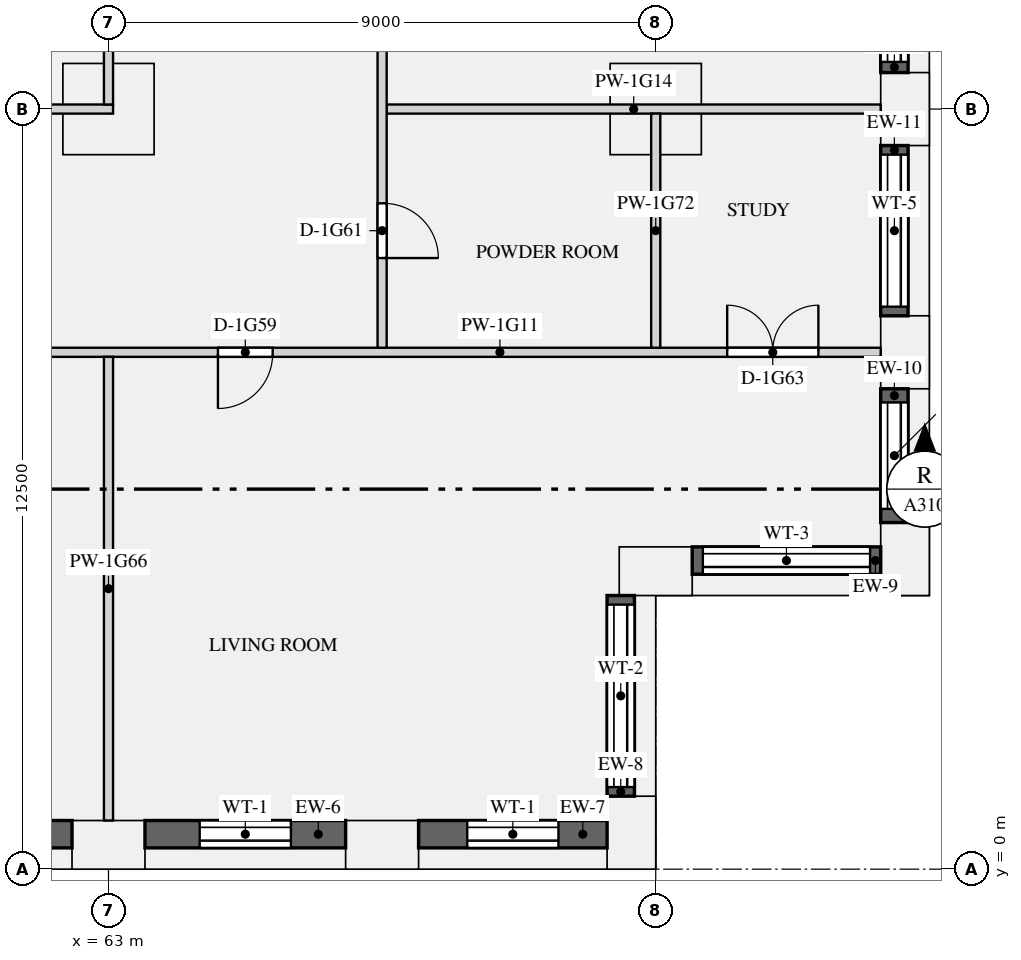
"""IFC4 building model, lengths in metres.
Left out: names, types, materials, properties, quantities, classifications, styles, units other than length and angle.
Written with IfcOpenShell. Run it as: python <this file> out.ifc"""

import sys

from ifc_helpers import new_model, si_unit, direction, frame, frame_2d, origin, origin_2d, place, context, subcontext, project, spatial, rectangle, extrude, element, fill, save


model = new_model("IFC4")
c1 = context("Model", 3, precision=1e-05, world=origin(), true_north=direction((0.0, 1.0)))
c2 = subcontext(c1, "Body", "Model", "MODEL_VIEW")
j1 = project(units=[si_unit("LENGTHUNIT", "METRE"), si_unit("PLANEANGLEUNIT", "RADIAN")], contexts=[c1])
p1 = place(None, origin())
s1 = spatial("IfcSite", under=j1, at=p1, CompositionType="ELEMENT")
p2 = place(p1, origin())
s2 = spatial("IfcBuilding", under=s1, at=p2, CompositionType="ELEMENT")
p3 = place(p2, frame((0.0, 0.0, 66.75)))
s3 = spatial("IfcBuildingStorey", under=s2, at=p3, CompositionType="ELEMENT", Elevation=66.75)
for number, where, z_axis, x_axis in (
    (1, (63.0, 0.4, 0.0), (0.0, 0.0, 1.0), (1.0, 0.0, 0.0)),
    (2, (67.5, 0.4, 0.0), (0.0, 0.0, 1.0), (1.0, 0.0, 0.0)),
    (3, (71.6, 0.6, 0.0), (0.0, 0.0, 1.0), (0.0, 1.0, 0.0)),
    (4, (72.0, 4.9, 0.0), (0.0, 0.0, 1.0), (1.0, 0.0, 0.0)),
    (5, (76.1, 5.1, 0.0), (0.0, 0.0, 1.0), (0.0, 1.0, 0.0)),
    (6, (76.1, 8.5, 0.0), (0.0, 0.0, 1.0), (0.0, 1.0, 0.0)),
    (7, (76.1, 12.5, 0.0), (0.0, 0.0, 1.0), (0.0, 1.0, 0.0)),
):
    element("IfcColumn", number, at=place(p3, frame(where, z_axis=z_axis, x_axis=x_axis)), inside=s3, PredefinedType="USERDEFINED", context=c2, shape_type="SweptSolid", body=[
        extrude(rectangle(XDim=1.2, YDim=0.8, at=origin_2d()), origin(), (0.0, 0.0, 1.0), 3.15),
    ])
for number, where, z_axis, x_axis in (
    (8, (63.0, 12.5, 0.0), (0.0, 0.0, 1.0), (1.0, 0.0, 0.0)),
    (9, (72.0, 12.5, 0.0), (0.0, 0.0, 1.0), (1.0, 0.0, 0.0)),
):
    element("IfcColumn", number, at=place(p3, frame(where, z_axis=z_axis, x_axis=x_axis)), inside=s3, PredefinedType="COLUMN", context=c2, shape_type="SweptSolid", body=[
        extrude(rectangle(XDim=1.5, YDim=1.5, at=origin_2d()), origin(), (0.0, 0.0, 1.0), 3.15),
    ])
p4 = place(p3, frame((59.1, 0.575, 0.9), z_axis=(0.0, 0.0, 1.0), x_axis=(1.0, 0.0, 0.0)))
e10 = element("IfcWall", 10, at=p4, inside=s3, PredefinedType="SOLIDWALL", context=c2, shape_type="SweptSolid", body=[
    extrude(rectangle(XDim=3.3, YDim=0.45, at=frame_2d((1.65, 0.0))), origin(), (0.0, 0.0, 1.0), 1.93),
])
p5 = place(p4, frame((0.9, 0.0, 0.15)))
e11 = element("IfcOpeningElement", 11, at=p5, cuts=e10, PredefinedType="OPENING", context=c2, shape_type="SweptSolid", body=[
    extrude(rectangle(XDim=1.5, YDim=1.5, at=frame_2d((0.75, 0.75))), frame((0.0, 0.235, 0.0), z_axis=(0.0, -1.0, 0.0), x_axis=(1.0, 0.0, 0.0)), (0.0, 0.0, 1.0), 0.47),
])
p6 = place(p3, frame((63.6, 0.575, 0.9), z_axis=(0.0, 0.0, 1.0), x_axis=(1.0, 0.0, 0.0)))
e12 = element("IfcWall", 12, at=p6, inside=s3, PredefinedType="SOLIDWALL", context=c2, shape_type="SweptSolid", body=[
    extrude(rectangle(XDim=3.3, YDim=0.45, at=frame_2d((1.65, 0.0))), origin(), (0.0, 0.0, 1.0), 1.93),
])
p7 = place(p6, frame((0.9, 0.0, 0.15)))
e13 = element("IfcOpeningElement", 13, at=p7, cuts=e12, PredefinedType="OPENING", context=c2, shape_type="SweptSolid", body=[
    extrude(rectangle(XDim=1.5, YDim=1.5, at=frame_2d((0.75, 0.75))), frame((0.0, 0.235, 0.0), z_axis=(0.0, -1.0, 0.0), x_axis=(1.0, 0.0, 0.0)), (0.0, 0.0, 1.0), 0.47),
])
p8 = place(p3, frame((68.1, 0.575, 0.9), z_axis=(0.0, 0.0, 1.0), x_axis=(1.0, 0.0, 0.0)))
e14 = element("IfcWall", 14, at=p8, inside=s3, PredefinedType="SOLIDWALL", context=c2, shape_type="SweptSolid", body=[
    extrude(rectangle(XDim=3.1, YDim=0.45, at=frame_2d((1.55, 0.0))), origin(), (0.0, 0.0, 1.0), 1.93),
])
p9 = place(p8, frame((0.8, 0.0, 0.15)))
e15 = element("IfcOpeningElement", 15, at=p9, cuts=e14, PredefinedType="OPENING", context=c2, shape_type="SweptSolid", body=[
    extrude(rectangle(XDim=1.5, YDim=1.5, at=frame_2d((0.75, 0.75))), frame((0.0, 0.235, 0.0), z_axis=(0.0, -1.0, 0.0), x_axis=(1.0, 0.0, 0.0)), (0.0, 0.0, 1.0), 0.47),
])
p10 = place(p3, frame((71.425, 1.2, 0.9), z_axis=(0.0, 0.0, 1.0), x_axis=(0.0, 1.0, 0.0)))
e16 = element("IfcWall", 16, at=p10, inside=s3, PredefinedType="SOLIDWALL", context=c2, shape_type="SweptSolid", body=[
    extrude(rectangle(XDim=3.3, YDim=0.45, at=frame_2d((1.65, 0.0))), origin(), (0.0, 0.0, 1.0), 1.93),
])
p11 = place(p10, frame((0.15, 0.0, 0.15)))
e17 = element("IfcOpeningElement", 17, at=p11, cuts=e16, PredefinedType="OPENING", context=c2, shape_type="SweptSolid", body=[
    extrude(rectangle(XDim=3.0, YDim=1.5, at=frame_2d((1.5, 0.75))), frame((0.0, 0.235, 0.0), z_axis=(0.0, -1.0, 0.0), x_axis=(1.0, 0.0, 0.0)), (0.0, 0.0, 1.0), 0.47),
])
p12 = place(p3, frame((72.6, 5.075, 0.9), z_axis=(0.0, 0.0, 1.0), x_axis=(1.0, 0.0, 0.0)))
e18 = element("IfcWall", 18, at=p12, inside=s3, PredefinedType="SOLIDWALL", context=c2, shape_type="SweptSolid", body=[
    extrude(rectangle(XDim=3.1, YDim=0.45, at=frame_2d((1.55, 0.0))), origin(), (0.0, 0.0, 1.0), 1.93),
])
p13 = place(p12, frame((0.175, 0.0, 0.15)))
e19 = element("IfcOpeningElement", 19, at=p13, cuts=e18, PredefinedType="OPENING", context=c2, shape_type="SweptSolid", body=[
    extrude(rectangle(XDim=2.75, YDim=1.5, at=frame_2d((1.375, 0.75))), frame((0.0, 0.235, 0.0), z_axis=(0.0, -1.0, 0.0), x_axis=(1.0, 0.0, 0.0)), (0.0, 0.0, 1.0), 0.47),
])
p14 = place(p3, frame((75.925, 5.7, 0.9), z_axis=(0.0, 0.0, 1.0), x_axis=(0.0, 1.0, 0.0)))
e20 = element("IfcWall", 20, at=p14, inside=s3, PredefinedType="SOLIDWALL", context=c2, shape_type="SweptSolid", body=[
    extrude(rectangle(XDim=2.2, YDim=0.45, at=frame_2d((1.1, 0.0))), origin(), (0.0, 0.0, 1.0), 1.93),
])
p15 = place(p14, frame((0.225, 0.0, 0.15)))
e21 = element("IfcOpeningElement", 21, at=p15, cuts=e20, PredefinedType="OPENING", context=c2, shape_type="SweptSolid", body=[
    extrude(rectangle(XDim=1.75, YDim=1.5, at=frame_2d((0.875, 0.75))), frame((0.0, 0.235, 0.0), z_axis=(0.0, -1.0, 0.0), x_axis=(1.0, 0.0, 0.0)), (0.0, 0.0, 1.0), 0.47),
])
p16 = place(p3, frame((75.925, 9.1, 0.9), z_axis=(0.0, 0.0, 1.0), x_axis=(0.0, 1.0, 0.0)))
e22 = element("IfcWall", 22, at=p16, inside=s3, PredefinedType="SOLIDWALL", context=c2, shape_type="SweptSolid", body=[
    extrude(rectangle(XDim=2.8, YDim=0.45, at=frame_2d((1.4, 0.0))), origin(), (0.0, 0.0, 1.0), 1.93),
])
p17 = place(p16, frame((0.15, 0.0, 0.15)))
e23 = element("IfcOpeningElement", 23, at=p17, cuts=e22, PredefinedType="OPENING", context=c2, shape_type="SweptSolid", body=[
    extrude(rectangle(XDim=2.5, YDim=1.5, at=frame_2d((1.25, 0.75))), frame((0.0, 0.235, 0.0), z_axis=(0.0, -1.0, 0.0), x_axis=(1.0, 0.0, 0.0)), (0.0, 0.0, 1.0), 0.47),
])
p18 = place(p3, frame((75.925, 13.1, 0.9), z_axis=(0.0, 0.0, 1.0), x_axis=(0.0, 1.0, 0.0)))
e24 = element("IfcWall", 24, at=p18, inside=s3, PredefinedType="SOLIDWALL", context=c2, shape_type="SweptSolid", body=[
    extrude(rectangle(XDim=2.6, YDim=0.45, at=frame_2d((1.3, 0.0))), origin(), (0.0, 0.0, 1.0), 1.93),
])
p19 = place(p18, frame((0.175, 0.0, 0.15)))
e25 = element("IfcOpeningElement", 25, at=p19, cuts=e24, PredefinedType="OPENING", context=c2, shape_type="SweptSolid", body=[
    extrude(rectangle(XDim=2.25, YDim=1.5, at=frame_2d((1.125, 0.75))), frame((0.0, 0.235, 0.0), z_axis=(0.0, -1.0, 0.0), x_axis=(1.0, 0.0, 0.0)), (0.0, 0.0, 1.0), 0.47),
])
p20 = place(p3, frame((54.0, 8.5, 0.0), z_axis=(0.0, 0.0, 1.0), x_axis=(1.0, 0.0, 0.0)))
e26 = element("IfcWall", 26, at=p20, inside=s3, PredefinedType="PARTITIONING", context=c2, shape_type="SweptSolid", body=[
    extrude(rectangle(XDim=21.7, YDim=0.15, at=frame_2d((10.85, 0.0))), origin(), (0.0, 0.0, 1.0), 2.83),
])
p21 = place(p20, frame((6.3, 0.0, 0.0)))
e27 = element("IfcOpeningElement", 27, at=p21, cuts=e26, PredefinedType="OPENING", context=c2, shape_type="SweptSolid", body=[
    extrude(rectangle(XDim=0.9, YDim=2.1, at=frame_2d((0.45, 1.05))), frame((0.0, 0.085, 0.0), z_axis=(0.0, -1.0, 0.0), x_axis=(1.0, 0.0, 0.0)), (0.0, 0.0, 1.0), 0.17),
])
p22 = place(p20, frame((1.8, 0.0, 0.0)))
e28 = element("IfcOpeningElement", 28, at=p22, cuts=e26, PredefinedType="OPENING", context=c2, shape_type="SweptSolid", body=[
    extrude(rectangle(XDim=0.9, YDim=2.1, at=frame_2d((0.45, 1.05))), frame((0.0, 0.085, 0.0), z_axis=(0.0, -1.0, 0.0), x_axis=(1.0, 0.0, 0.0)), (0.0, 0.0, 1.0), 0.17),
])
p23 = place(p20, frame((10.8, 0.0, 0.0)))
e29 = element("IfcOpeningElement", 29, at=p23, cuts=e26, PredefinedType="OPENING", context=c2, shape_type="SweptSolid", body=[
    extrude(rectangle(XDim=0.9, YDim=2.1, at=frame_2d((0.45, 1.05))), frame((0.0, 0.085, 0.0), z_axis=(0.0, -1.0, 0.0), x_axis=(1.0, 0.0, 0.0)), (0.0, 0.0, 1.0), 0.17),
])
p24 = place(p20, frame((19.175, 0.0, 0.0)))
e30 = element("IfcOpeningElement", 30, at=p24, cuts=e26, PredefinedType="OPENING", context=c2, shape_type="SweptSolid", body=[
    extrude(rectangle(XDim=1.5, YDim=2.1, at=frame_2d((0.75, 1.05))), frame((0.0, 0.085, 0.0), z_axis=(0.0, -1.0, 0.0), x_axis=(1.0, 0.0, 0.0)), (0.0, 0.0, 1.0), 0.17),
])
p25 = place(p3, frame((58.425, 12.5, 0.0), z_axis=(0.0, 0.0, 1.0), x_axis=(1.0, 0.0, 0.0)))
e31 = element("IfcWall", 31, at=p25, inside=s3, PredefinedType="PARTITIONING", context=c2, shape_type="SweptSolid", body=[
    extrude(rectangle(XDim=4.65, YDim=0.15, at=frame_2d((2.325, 0.0))), origin(), (0.0, 0.0, 1.0), 2.83),
])
p26 = place(p3, frame((67.575, 12.5, 0.0), z_axis=(0.0, 0.0, 1.0), x_axis=(1.0, 0.0, 0.0)))
e32 = element("IfcWall", 32, at=p26, inside=s3, PredefinedType="PARTITIONING", context=c2, shape_type="SweptSolid", body=[
    extrude(rectangle(XDim=8.125, YDim=0.15, at=frame_2d((4.062, 0.0))), origin(), (0.0, 0.0, 1.0), 2.83),
])
p27 = place(p3, frame((63.0, 0.8, 0.0), z_axis=(0.0, 0.0, 1.0), x_axis=(0.0, 1.0, 0.0)))
e33 = element("IfcWall", 33, at=p27, inside=s3, PredefinedType="PARTITIONING", context=c2, shape_type="SweptSolid", body=[
    extrude(rectangle(XDim=7.625, YDim=0.15, at=frame_2d((3.812, 0.0))), origin(), (0.0, 0.0, 1.0), 2.83),
])
p28 = place(p3, frame((63.0, 12.575, 0.0), z_axis=(0.0, 0.0, 1.0), x_axis=(0.0, 1.0, 0.0)))
e34 = element("IfcWall", 34, at=p28, inside=s3, PredefinedType="PARTITIONING", context=c2, shape_type="SweptSolid", body=[
    extrude(rectangle(XDim=15.85, YDim=0.15, at=frame_2d((7.925, 0.0))), origin(), (0.0, 0.0, 1.0), 2.83),
])
p29 = place(p28, frame((6.85, 0.0, 0.0)))
e35 = element("IfcOpeningElement", 35, at=p29, cuts=e34, PredefinedType="OPENING", context=c2, shape_type="SweptSolid", body=[
    extrude(rectangle(XDim=0.9, YDim=2.1, at=frame_2d((0.45, 1.05))), frame((0.0, 0.085, 0.0), z_axis=(0.0, -1.0, 0.0), x_axis=(1.0, 0.0, 0.0)), (0.0, 0.0, 1.0), 0.17),
])
p30 = place(p3, frame((72.0, 8.575, 0.0), z_axis=(0.0, 0.0, 1.0), x_axis=(0.0, 1.0, 0.0)))
e36 = element("IfcWall", 36, at=p30, inside=s3, PredefinedType="PARTITIONING", context=c2, shape_type="SweptSolid", body=[
    extrude(rectangle(XDim=3.85, YDim=0.15, at=frame_2d((1.925, 0.0))), origin(), (0.0, 0.0, 1.0), 2.83),
])
p31 = place(p3, frame((67.5, 8.575, 0.0), z_axis=(0.0, 0.0, 1.0), x_axis=(0.0, 1.0, 0.0)))
e37 = element("IfcWall", 37, at=p31, inside=s3, PredefinedType="PARTITIONING", context=c2, shape_type="SweptSolid", body=[
    extrude(rectangle(XDim=15.35, YDim=0.15, at=frame_2d((7.675, 0.0))), origin(), (0.0, 0.0, 1.0), 2.83),
])
p32 = place(p31, frame((7.475, 0.0, 0.0)))
e38 = element("IfcOpeningElement", 38, at=p32, cuts=e37, PredefinedType="OPENING", context=c2, shape_type="SweptSolid", body=[
    extrude(rectangle(XDim=0.9, YDim=2.1, at=frame_2d((0.45, 1.05))), frame((0.0, 0.085, 0.0), z_axis=(0.0, -1.0, 0.0), x_axis=(1.0, 0.0, 0.0)), (0.0, 0.0, 1.0), 0.17),
])
p33 = place(p31, frame((1.475, 0.0, 0.0)))
e39 = element("IfcOpeningElement", 39, at=p33, cuts=e37, PredefinedType="OPENING", context=c2, shape_type="SweptSolid", body=[
    extrude(rectangle(XDim=0.9, YDim=2.1, at=frame_2d((0.45, 1.05))), frame((0.0, 0.085, 0.0), z_axis=(0.0, -1.0, 0.0), x_axis=(1.0, 0.0, 0.0)), (0.0, 0.0, 1.0), 0.17),
])
p34 = place(p7, origin())
e40 = element("IfcWindow", 40, at=p34, inside=s3, PartitioningType="SINGLE_PANEL", PredefinedType="WINDOW", context=c2, shape_type="SweptSolid", body=[
    extrude(rectangle(XDim=1.5, YDim=1.5, at=frame_2d((0.75, 0.75))), frame((0.0, -0.065, 0.0), z_axis=(0.0, -1.0, 0.0), x_axis=(1.0, 0.0, 0.0)), (0.0, 0.0, 1.0), 0.06),
])
fill(e13, e40)
p35 = place(p9, origin())
e41 = element("IfcWindow", 41, at=p35, inside=s3, PartitioningType="SINGLE_PANEL", PredefinedType="WINDOW", context=c2, shape_type="SweptSolid", body=[
    extrude(rectangle(XDim=1.5, YDim=1.5, at=frame_2d((0.75, 0.75))), frame((0.0, -0.065, 0.0), z_axis=(0.0, -1.0, 0.0), x_axis=(1.0, 0.0, 0.0)), (0.0, 0.0, 1.0), 0.06),
])
fill(e15, e41)
p36 = place(p11, origin())
e42 = element("IfcWindow", 42, at=p36, inside=s3, PartitioningType="SINGLE_PANEL", PredefinedType="WINDOW", context=c2, shape_type="SweptSolid", body=[
    extrude(rectangle(XDim=3.0, YDim=1.5, at=frame_2d((1.5, 0.75))), frame((0.0, -0.065, 0.0), z_axis=(0.0, -1.0, 0.0), x_axis=(1.0, 0.0, 0.0)), (0.0, 0.0, 1.0), 0.06),
])
fill(e17, e42)
p37 = place(p13, origin())
e43 = element("IfcWindow", 43, at=p37, inside=s3, PartitioningType="SINGLE_PANEL", PredefinedType="WINDOW", context=c2, shape_type="SweptSolid", body=[
    extrude(rectangle(XDim=2.75, YDim=1.5, at=frame_2d((1.375, 0.75))), frame((0.0, -0.065, 0.0), z_axis=(0.0, -1.0, 0.0), x_axis=(1.0, 0.0, 0.0)), (0.0, 0.0, 1.0), 0.06),
])
fill(e19, e43)
p38 = place(p15, origin())
e44 = element("IfcWindow", 44, at=p38, inside=s3, PartitioningType="SINGLE_PANEL", PredefinedType="WINDOW", context=c2, shape_type="SweptSolid", body=[
    extrude(rectangle(XDim=1.75, YDim=1.5, at=frame_2d((0.875, 0.75))), frame((0.0, -0.065, 0.0), z_axis=(0.0, -1.0, 0.0), x_axis=(1.0, 0.0, 0.0)), (0.0, 0.0, 1.0), 0.06),
])
fill(e21, e44)
p39 = place(p17, origin())
e45 = element("IfcWindow", 45, at=p39, inside=s3, PartitioningType="SINGLE_PANEL", PredefinedType="WINDOW", context=c2, shape_type="SweptSolid", body=[
    extrude(rectangle(XDim=2.5, YDim=1.5, at=frame_2d((1.25, 0.75))), frame((0.0, -0.065, 0.0), z_axis=(0.0, -1.0, 0.0), x_axis=(1.0, 0.0, 0.0)), (0.0, 0.0, 1.0), 0.06),
])
fill(e23, e45)
p40 = place(p19, origin())
e46 = element("IfcWindow", 46, at=p40, inside=s3, PartitioningType="SINGLE_PANEL", PredefinedType="WINDOW", context=c2, shape_type="SweptSolid", body=[
    extrude(rectangle(XDim=2.25, YDim=1.5, at=frame_2d((1.125, 0.75))), frame((0.0, -0.065, 0.0), z_axis=(0.0, -1.0, 0.0), x_axis=(1.0, 0.0, 0.0)), (0.0, 0.0, 1.0), 0.06),
])
fill(e25, e46)
p41 = place(p23, frame((0.9, 0.0, 0.0), z_axis=(0.0, 0.0, 1.0), x_axis=(-1.0, 0.0, 0.0)))
e47 = element("IfcDoor", 47, at=p41, inside=s3, OperationType="SINGLE_SWING_RIGHT", PredefinedType="DOOR", context=c2, shape_type="SweptSolid", body=[
    extrude(rectangle(XDim=0.9, YDim=2.1, at=frame_2d((0.45, 1.05))), frame((0.0, 0.025, 0.0), z_axis=(0.0, -1.0, 0.0), x_axis=(1.0, 0.0, 0.0)), (0.0, 0.0, 1.0), 0.05),
])
fill(e29, e47)
p42 = place(p33, frame((0.9, 0.0, 0.0), z_axis=(0.0, 0.0, 1.0), x_axis=(-1.0, 0.0, 0.0)))
e48 = element("IfcDoor", 48, at=p42, inside=s3, OperationType="SINGLE_SWING_RIGHT", PredefinedType="DOOR", context=c2, shape_type="SweptSolid", body=[
    extrude(rectangle(XDim=0.9, YDim=2.1, at=frame_2d((0.45, 1.05))), frame((0.0, 0.025, 0.0), z_axis=(0.0, -1.0, 0.0), x_axis=(1.0, 0.0, 0.0)), (0.0, 0.0, 1.0), 0.05),
])
fill(e39, e48)
p43 = place(p24, origin())
e49 = element("IfcDoor", 49, at=p43, inside=s3, OperationType="DOUBLE_DOOR_SINGLE_SWING", PredefinedType="DOOR", context=c2, shape_type="SweptSolid", body=[
    extrude(rectangle(XDim=1.5, YDim=2.1, at=frame_2d((0.75, 1.05))), frame((0.0, 0.025, 0.0), z_axis=(0.0, -1.0, 0.0), x_axis=(1.0, 0.0, 0.0)), (0.0, 0.0, 1.0), 0.05),
])
fill(e30, e49)
save(model, sys.argv[1])
